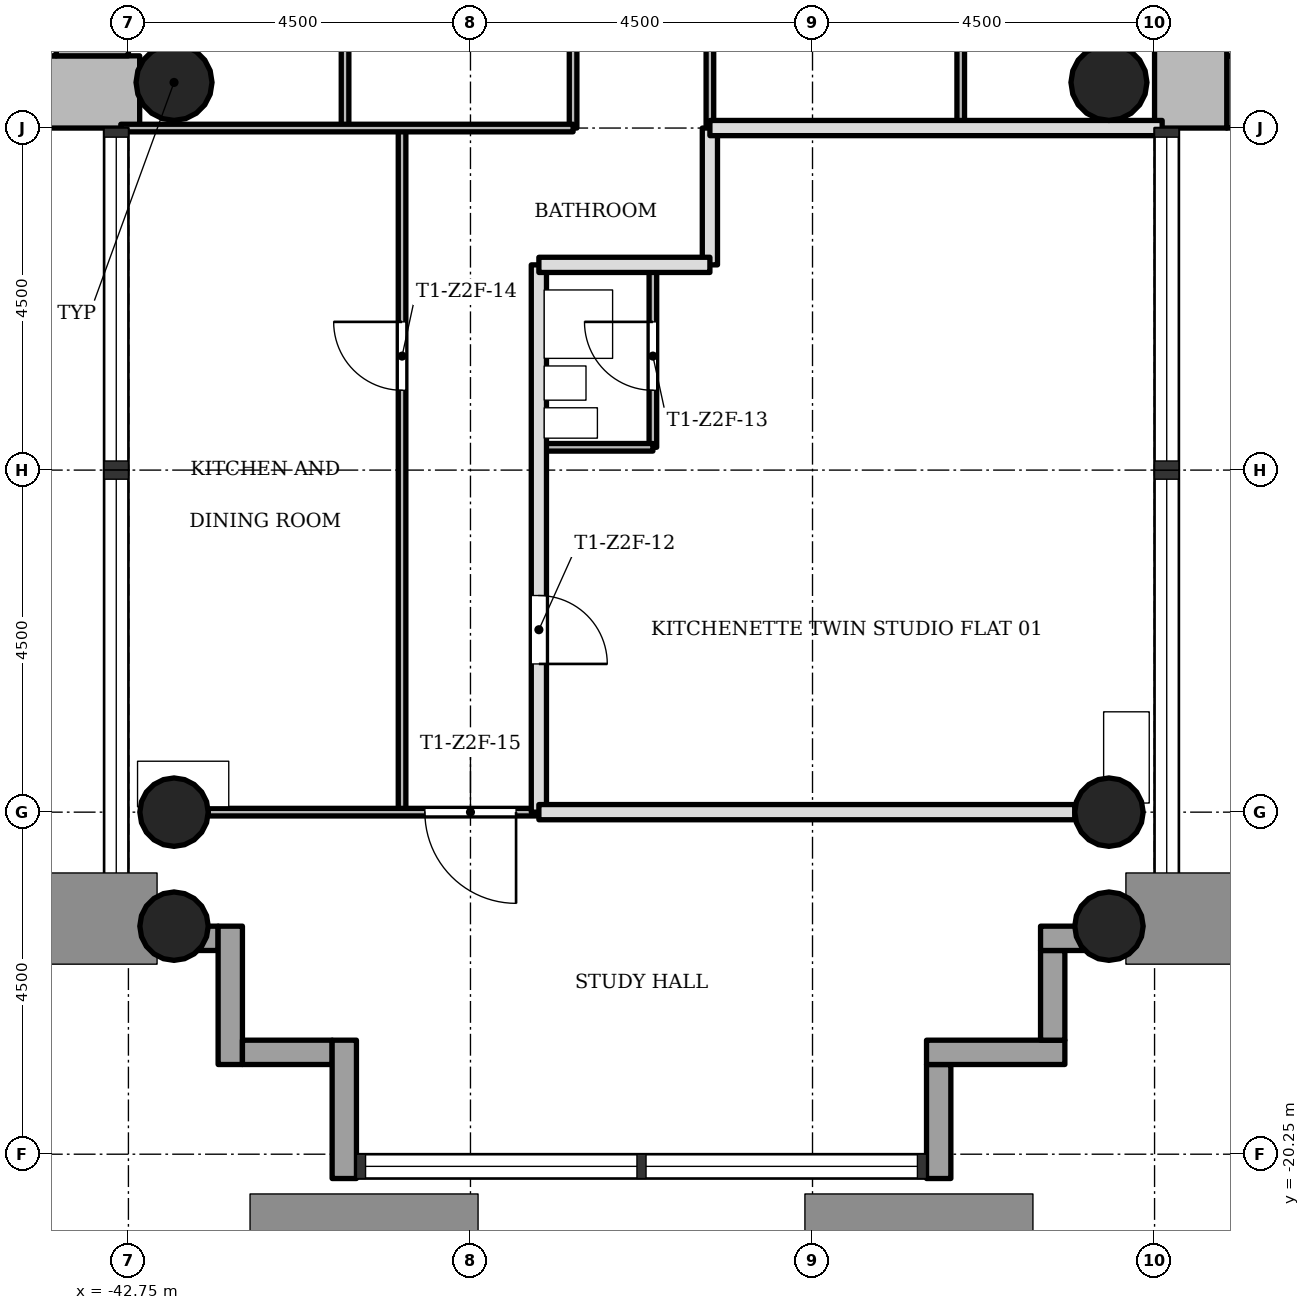
"""IFC4 building model, lengths in metres.
Left out: names, types, materials, properties, quantities, classifications, styles, units other than length and angle.
Written with IfcOpenShell. Run it as: python <this file> out.ifc"""

import sys

from ifc_helpers import new_model, si_unit, direction, frame, frame_2d, origin, origin_2d, place, context, subcontext, project, spatial, rectangle, hollow_circle, extrude, element, fill, save


model = new_model("IFC4")
c1 = context("Model", 3, precision=1e-05, world=origin(), true_north=direction((0.0, 1.0)))
c2 = subcontext(c1, "Body", "Model", "MODEL_VIEW")
j1 = project(units=[si_unit("LENGTHUNIT", "METRE"), si_unit("PLANEANGLEUNIT", "RADIAN")], contexts=[c1])
p1 = place(None, origin())
s1 = spatial("IfcSite", under=j1, at=p1, CompositionType="ELEMENT")
p2 = place(p1, origin())
s2 = spatial("IfcBuilding", under=s1, at=p2, CompositionType="ELEMENT")
p3 = place(p2, frame((0.0, 0.0, 107.2)))
s3 = spatial("IfcBuildingStorey", under=s2, at=p3, CompositionType="ELEMENT", Elevation=107.2)
p4 = place(p3, frame((-28.3, -6.275, 0.0), z_axis=(0.0, 0.0, 1.0), x_axis=(1.0, 0.0, 0.0)))
e1 = element("IfcWall", 1, at=p4, inside=s3, PredefinedType="SHEAR", context=c2, shape_type="SweptSolid", body=[
    extrude(rectangle(XDim=8.05, YDim=0.95, at=frame_2d((4.025, 0.0))), origin(), (0.0, 0.0, 1.0), 3.4),
])
p5 = place(p3, frame((-28.775, 5.8, 0.0), z_axis=(0.0, 0.0, 1.0), x_axis=(0.0, -1.0, 0.0)))
e2 = element("IfcWall", 2, at=p5, inside=s3, PredefinedType="SHEAR", context=c2, shape_type="SweptSolid", body=[
    extrude(rectangle(XDim=12.55, YDim=0.95, at=frame_2d((6.275, 0.0))), origin(), (0.0, 0.0, 1.0), 3.4),
])
p6 = place(p5, frame((4.9, 0.0, 0.0)))
e3 = element("IfcOpeningElement", 3, at=p6, cuts=e2, PredefinedType="OPENING", context=c2, shape_type="SweptSolid", body=[
    extrude(rectangle(XDim=1.8, YDim=2.1, at=frame_2d((0.9, 1.05))), frame((0.0, 0.485, 0.0), z_axis=(0.0, -1.0, 0.0), x_axis=(1.0, 0.0, 0.0)), (0.0, 0.0, 1.0), 0.97),
])
p7 = place(p3, frame((-51.298, -6.275, 0.0), z_axis=(0.0, 0.0, 1.0), x_axis=(1.0, 0.0, 0.0)))
e4 = element("IfcWall", 4, at=p7, inside=s3, PredefinedType="SHEAR", context=c2, shape_type="SweptSolid", body=[
    extrude(rectangle(XDim=8.696, YDim=0.95, at=frame_2d((4.348, 0.0))), origin(), (0.0, 0.0, 1.0), 3.4),
])
p8 = place(p3, frame((-43.225, -5.8, 0.0), z_axis=(0.0, 0.0, 1.0), x_axis=(0.0, 1.0, 0.0)))
e5 = element("IfcWall", 5, at=p8, inside=s3, PredefinedType="SHEAR", context=c2, shape_type="SweptSolid", body=[
    extrude(rectangle(XDim=12.55, YDim=0.95, at=frame_2d((6.275, 0.0))), origin(), (0.0, 0.0, 1.0), 3.4),
])
p9 = place(p8, frame((4.9, 0.0, 0.0)))
e6 = element("IfcOpeningElement", 6, at=p9, cuts=e5, PredefinedType="OPENING", context=c2, shape_type="SweptSolid", body=[
    extrude(rectangle(XDim=1.8, YDim=2.1, at=frame_2d((0.9, 1.05))), frame((0.0, 0.485, 0.0), z_axis=(0.0, -1.0, 0.0), x_axis=(1.0, 0.0, 0.0)), (0.0, 0.0, 1.0), 0.97),
])
for number, where, z_axis, x_axis in (
    (7, (-42.15, -15.75, 0.0), (0.0, 0.0, 1.0), (1.0, 0.0, 0.0)),
    (8, (-29.85, -15.75, 0.0), (0.0, 0.0, 1.0), (1.0, 0.0, 0.0)),
    (9, (-42.15, -17.25, 0.0), (0.0, 0.0, 1.0), (1.0, 0.0, 0.0)),
    (10, (-29.85, -17.25, 0.0), (0.0, 0.0, 1.0), (1.0, 0.0, 0.0)),
):
    element("IfcColumn", number, at=place(p3, frame(where, z_axis=z_axis, x_axis=x_axis)), inside=s3, PredefinedType="COLUMN", context=c2, shape_type="SweptSolid", body=[
        extrude(hollow_circle(Radius=0.45, WallThickness=0.032, at=origin_2d()), origin(), (0.0, 0.0, 1.0), 3.4),
    ])
for number, where, z_axis, x_axis in (
    (11, (-42.15, -6.15, 0.0), (0.0, 0.0, 1.0), (1.0, 0.0, 0.0)),
    (12, (-29.85, -6.15, 0.0), (0.0, 0.0, 1.0), (1.0, 0.0, 0.0)),
):
    element("IfcColumn", number, at=place(p3, frame(where, z_axis=z_axis, x_axis=x_axis)), inside=s3, PredefinedType="COLUMN", context=c2, shape_type="SweptSolid", body=[
        extrude(hollow_circle(Radius=0.5, WallThickness=0.036, at=origin_2d()), origin(), (0.0, 0.0, 1.0), 3.4),
    ])
p10 = place(p3, frame((-43.07, -17.41, -0.3), z_axis=(0.0, 0.0, 1.0), x_axis=(1.0, 0.0, 0.0)))
e13 = element("IfcWall", 13, at=p10, inside=s3, PredefinedType="STANDARD", context=c2, shape_type="SweptSolid", body=[
    extrude(rectangle(XDim=1.5, YDim=0.32, at=frame_2d((0.75, 0.0))), origin(), (0.0, 0.0, 1.0), 3.4),
])
p11 = place(p3, frame((-41.41, -17.25, -0.3), z_axis=(0.0, 0.0, 1.0), x_axis=(0.0, -1.0, 0.0)))
e14 = element("IfcWall", 14, at=p11, inside=s3, PredefinedType="STANDARD", context=c2, shape_type="SweptSolid", body=[
    extrude(rectangle(XDim=1.82, YDim=0.32, at=frame_2d((0.91, 0.0))), origin(), (0.0, 0.0, 1.0), 3.4),
])
p12 = place(p3, frame((-41.25, -18.91, -0.3), z_axis=(0.0, 0.0, 1.0), x_axis=(1.0, 0.0, 0.0)))
e15 = element("IfcWall", 15, at=p12, inside=s3, PredefinedType="STANDARD", context=c2, shape_type="SweptSolid", body=[
    extrude(rectangle(XDim=1.18, YDim=0.32, at=frame_2d((0.59, 0.0))), origin(), (0.0, 0.0, 1.0), 3.4),
])
p13 = place(p3, frame((-39.91, -18.75, -0.3), z_axis=(0.0, 0.0, 1.0), x_axis=(0.0, -1.0, 0.0)))
e16 = element("IfcWall", 16, at=p13, inside=s3, PredefinedType="STANDARD", context=c2, shape_type="SweptSolid", body=[
    extrude(rectangle(XDim=1.82, YDim=0.32, at=frame_2d((0.91, 0.0))), origin(), (0.0, 0.0, 1.0), 3.4),
])
p14 = place(p3, frame((-32.09, -20.57, -0.3), z_axis=(0.0, 0.0, 1.0), x_axis=(0.0, 1.0, 0.0)))
e17 = element("IfcWall", 17, at=p14, inside=s3, PredefinedType="STANDARD", context=c2, shape_type="SweptSolid", body=[
    extrude(rectangle(XDim=1.5, YDim=0.32, at=frame_2d((0.75, 0.0))), origin(), (0.0, 0.0, 1.0), 3.4),
])
p15 = place(p3, frame((-32.25, -18.91, -0.3), z_axis=(0.0, 0.0, 1.0), x_axis=(1.0, 0.0, 0.0)))
e18 = element("IfcWall", 18, at=p15, inside=s3, PredefinedType="STANDARD", context=c2, shape_type="SweptSolid", body=[
    extrude(rectangle(XDim=1.82, YDim=0.32, at=frame_2d((0.91, 0.0))), origin(), (0.0, 0.0, 1.0), 3.4),
])
p16 = place(p3, frame((-30.59, -18.75, -0.3), z_axis=(0.0, 0.0, 1.0), x_axis=(0.0, 1.0, 0.0)))
e19 = element("IfcWall", 19, at=p16, inside=s3, PredefinedType="STANDARD", context=c2, shape_type="SweptSolid", body=[
    extrude(rectangle(XDim=1.18, YDim=0.32, at=frame_2d((0.59, 0.0))), origin(), (0.0, 0.0, 1.0), 3.4),
])
p17 = place(p3, frame((-30.75, -17.41, -0.3), z_axis=(0.0, 0.0, 1.0), x_axis=(1.0, 0.0, 0.0)))
e20 = element("IfcWall", 20, at=p17, inside=s3, PredefinedType="STANDARD", context=c2, shape_type="SweptSolid", body=[
    extrude(rectangle(XDim=1.82, YDim=0.32, at=frame_2d((0.91, 0.0))), origin(), (0.0, 0.0, 1.0), 3.4),
])
p18 = place(p3, frame((-39.9, -6.75, 0.0), z_axis=(0.0, 0.0, 1.0), x_axis=(0.0, 1.0, 0.0)))
e21 = element("IfcWall", 21, at=p18, inside=s3, PredefinedType="PARTITIONING", context=c2, shape_type="SweptSolid", body=[
    extrude(rectangle(XDim=5.25, YDim=0.1, at=frame_2d((2.625, 0.0))), origin(), (0.0, 0.0, 1.0), 3.0),
])
p19 = place(p3, frame((-39.15, -15.75, 0.0), z_axis=(0.0, 0.0, 1.0), x_axis=(0.0, 1.0, 0.0)))
e22 = element("IfcWall", 22, at=p19, inside=s3, PredefinedType="PARTITIONING", context=c2, shape_type="SweptSolid", body=[
    extrude(rectangle(XDim=9.0, YDim=0.1, at=frame_2d((4.5, 0.0))), origin(), (0.0, 0.0, 1.0), 3.0),
])
p20 = place(p19, frame((5.55, 0.0, 0.0)))
e23 = element("IfcOpeningElement", 23, at=p20, cuts=e22, PredefinedType="OPENING", context=c2, shape_type="SweptSolid", body=[
    extrude(rectangle(XDim=0.9, YDim=2.1, at=frame_2d((0.45, 1.05))), frame((0.0, 0.06, 0.0), z_axis=(0.0, -1.0, 0.0), x_axis=(1.0, 0.0, 0.0)), (0.0, 0.0, 1.0), 0.12),
])
p21 = place(p3, frame((-37.35, -15.75, 0.0), z_axis=(0.0, 0.0, 1.0), x_axis=(0.0, 1.0, 0.0)))
e24 = element("IfcWall", 24, at=p21, inside=s3, PredefinedType="SOLIDWALL", context=c2, shape_type="SweptSolid", body=[
    extrude(rectangle(XDim=7.2, YDim=0.2, at=frame_2d((3.6, 0.0))), origin(), (0.0, 0.0, 1.0), 3.0),
])
p22 = place(p21, frame((1.95, 0.0, 0.0)))
e25 = element("IfcOpeningElement", 25, at=p22, cuts=e24, PredefinedType="OPENING", context=c2, shape_type="SweptSolid", body=[
    extrude(rectangle(XDim=0.9, YDim=2.1, at=frame_2d((0.45, 1.05))), frame((0.0, 0.11, 0.0), z_axis=(0.0, -1.0, 0.0), x_axis=(1.0, 0.0, 0.0)), (0.0, 0.0, 1.0), 0.22),
])
p23 = place(p3, frame((-36.9, -6.75, 0.0), z_axis=(0.0, 0.0, 1.0), x_axis=(0.0, 1.0, 0.0)))
e26 = element("IfcWall", 26, at=p23, inside=s3, PredefinedType="PARTITIONING", context=c2, shape_type="SweptSolid", body=[
    extrude(rectangle(XDim=5.25, YDim=0.1, at=frame_2d((2.625, 0.0))), origin(), (0.0, 0.0, 1.0), 3.0),
])
p24 = place(p23, frame((2.175, 0.0, 0.0)))
e27 = element("IfcOpeningElement", 27, at=p24, cuts=e26, PredefinedType="OPENING", context=c2, shape_type="SweptSolid", body=[
    extrude(rectangle(XDim=0.9, YDim=2.1, at=frame_2d((0.45, 1.05))), frame((0.0, 0.06, 0.0), z_axis=(0.0, -1.0, 0.0), x_axis=(1.0, 0.0, 0.0)), (0.0, 0.0, 1.0), 0.12),
])
p25 = place(p3, frame((-35.85, -10.95, 0.0), z_axis=(0.0, 0.0, 1.0), x_axis=(0.0, 1.0, 0.0)))
e28 = element("IfcWall", 28, at=p25, inside=s3, PredefinedType="PARTITIONING", context=c2, shape_type="SweptSolid", body=[
    extrude(rectangle(XDim=2.4, YDim=0.1, at=frame_2d((1.2, 0.0))), origin(), (0.0, 0.0, 1.0), 3.0),
])
p26 = place(p25, frame((0.75, 0.0, 0.0)))
e29 = element("IfcOpeningElement", 29, at=p26, cuts=e28, PredefinedType="OPENING", context=c2, shape_type="SweptSolid", body=[
    extrude(rectangle(XDim=0.9, YDim=2.1, at=frame_2d((0.45, 1.05))), frame((0.0, 0.06, 0.0), z_axis=(0.0, -1.0, 0.0), x_axis=(1.0, 0.0, 0.0)), (0.0, 0.0, 1.0), 0.12),
])
p27 = place(p3, frame((-35.1, -6.75, 0.0), z_axis=(0.0, 0.0, 1.0), x_axis=(0.0, 1.0, 0.0)))
e30 = element("IfcWall", 30, at=p27, inside=s3, PredefinedType="PARTITIONING", context=c2, shape_type="SweptSolid", body=[
    extrude(rectangle(XDim=5.25, YDim=0.1, at=frame_2d((2.625, 0.0))), origin(), (0.0, 0.0, 1.0), 3.0),
])
p28 = place(p27, frame((2.175, 0.0, 0.0)))
e31 = element("IfcOpeningElement", 31, at=p28, cuts=e30, PredefinedType="OPENING", context=c2, shape_type="SweptSolid", body=[
    extrude(rectangle(XDim=0.9, YDim=2.1, at=frame_2d((0.45, 1.05))), frame((0.0, 0.06, 0.0), z_axis=(0.0, -1.0, 0.0), x_axis=(1.0, 0.0, 0.0)), (0.0, 0.0, 1.0), 0.12),
])
p29 = place(p3, frame((-35.1, -8.55, 0.0), z_axis=(0.0, 0.0, 1.0), x_axis=(0.0, 1.0, 0.0)))
e32 = element("IfcWall", 32, at=p29, inside=s3, PredefinedType="SOLIDWALL", context=c2, shape_type="SweptSolid", body=[
    extrude(rectangle(XDim=1.8, YDim=0.2, at=frame_2d((0.9, 0.0))), origin(), (0.0, 0.0, 1.0), 3.0),
])
p30 = place(p3, frame((-31.8, -6.75, 0.0), z_axis=(0.0, 0.0, 1.0), x_axis=(0.0, 1.0, 0.0)))
e33 = element("IfcWall", 33, at=p30, inside=s3, PredefinedType="PARTITIONING", context=c2, shape_type="SweptSolid", body=[
    extrude(rectangle(XDim=5.25, YDim=0.1, at=frame_2d((2.625, 0.0))), origin(), (0.0, 0.0, 1.0), 3.0),
])
p31 = place(p3, frame((-41.7, -15.75, 0.0), z_axis=(0.0, 0.0, 1.0), x_axis=(1.0, 0.0, 0.0)))
e34 = element("IfcWall", 34, at=p31, inside=s3, PredefinedType="PARTITIONING", context=c2, shape_type="SweptSolid", body=[
    extrude(rectangle(XDim=4.35, YDim=0.1, at=frame_2d((2.175, 0.0))), origin(), (0.0, 0.0, 1.0), 3.0),
])
p32 = place(p31, frame((2.85, 0.0, 0.0)))
e35 = element("IfcOpeningElement", 35, at=p32, cuts=e34, PredefinedType="OPENING", context=c2, shape_type="SweptSolid", body=[
    extrude(rectangle(XDim=1.2, YDim=2.1, at=frame_2d((0.6, 1.05))), frame((0.0, 0.06, 0.0), z_axis=(0.0, -1.0, 0.0), x_axis=(1.0, 0.0, 0.0)), (0.0, 0.0, 1.0), 0.12),
])
p33 = place(p3, frame((-37.35, -15.75, 0.0), z_axis=(0.0, 0.0, 1.0), x_axis=(1.0, 0.0, 0.0)))
e36 = element("IfcWall", 36, at=p33, inside=s3, PredefinedType="SOLIDWALL", context=c2, shape_type="SweptSolid", body=[
    extrude(rectangle(XDim=7.05, YDim=0.2, at=frame_2d((3.525, 0.0))), origin(), (0.0, 0.0, 1.0), 3.0),
])
p34 = place(p3, frame((-37.35, -10.95, 0.0), z_axis=(0.0, 0.0, 1.0), x_axis=(1.0, 0.0, 0.0)))
e37 = element("IfcWall", 37, at=p34, inside=s3, PredefinedType="PARTITIONING", context=c2, shape_type="SweptSolid", body=[
    extrude(rectangle(XDim=1.5, YDim=0.1, at=frame_2d((0.75, 0.0))), origin(), (0.0, 0.0, 1.0), 3.0),
])
p35 = place(p3, frame((-37.35, -8.55, 0.0), z_axis=(0.0, 0.0, 1.0), x_axis=(1.0, 0.0, 0.0)))
e38 = element("IfcWall", 38, at=p35, inside=s3, PredefinedType="SOLIDWALL", context=c2, shape_type="SweptSolid", body=[
    extrude(rectangle(XDim=2.25, YDim=0.2, at=frame_2d((1.125, 0.0))), origin(), (0.0, 0.0, 1.0), 3.0),
])
p36 = place(p3, frame((-42.85, -6.75, 0.0), z_axis=(0.0, 0.0, 1.0), x_axis=(1.0, 0.0, 0.0)))
e39 = element("IfcWall", 39, at=p36, inside=s3, PredefinedType="PARTITIONING", context=c2, shape_type="SweptSolid", body=[
    extrude(rectangle(XDim=5.95, YDim=0.1, at=frame_2d((2.975, 0.0))), origin(), (0.0, 0.0, 1.0), 3.0),
])
p37 = place(p3, frame((-35.1, -6.75, 0.0), z_axis=(0.0, 0.0, 1.0), x_axis=(1.0, 0.0, 0.0)))
e40 = element("IfcWall", 40, at=p37, inside=s3, PredefinedType="SOLIDWALL", context=c2, shape_type="SweptSolid", body=[
    extrude(rectangle(XDim=5.95, YDim=0.2, at=frame_2d((2.975, 0.0))), origin(), (0.0, 0.0, 1.0), 3.0),
])
p38 = place(p3, frame((-43.825, -1.9, 0.0), z_axis=(0.0, 0.0, 1.0), x_axis=(0.0, -1.0, 0.0)))
e41 = element("IfcWall", 41, at=p38, inside=s3, PredefinedType="SHEAR", context=c2, shape_type="SweptSolid", body=[
    extrude(rectangle(XDim=3.9, YDim=0.25, at=frame_2d((1.95, 0.0))), origin(), (0.0, 0.0, 1.0), 3.4),
])
p39 = place(p22, origin())
e42 = element("IfcDoor", 42, at=p39, inside=s3, OperationType="SINGLE_SWING_LEFT", PredefinedType="DOOR", context=c2, shape_type="SweptSolid", body=[
    extrude(rectangle(XDim=0.9, YDim=2.1, at=frame_2d((0.45, 1.05))), frame((0.0, 0.025, 0.0), z_axis=(0.0, -1.0, 0.0), x_axis=(1.0, 0.0, 0.0)), (0.0, 0.0, 1.0), 0.05),
])
fill(e25, e42)
p40 = place(p26, origin())
e43 = element("IfcDoor", 43, at=p40, inside=s3, OperationType="SINGLE_SWING_LEFT", PredefinedType="DOOR", context=c2, shape_type="SweptSolid", body=[
    extrude(rectangle(XDim=0.9, YDim=2.1, at=frame_2d((0.45, 1.05))), frame((0.0, 0.025, 0.0), z_axis=(0.0, -1.0, 0.0), x_axis=(1.0, 0.0, 0.0)), (0.0, 0.0, 1.0), 0.05),
])
fill(e29, e43)
p41 = place(p20, origin())
e44 = element("IfcDoor", 44, at=p41, inside=s3, OperationType="SINGLE_SWING_LEFT", PredefinedType="DOOR", context=c2, shape_type="SweptSolid", body=[
    extrude(rectangle(XDim=0.9, YDim=2.1, at=frame_2d((0.45, 1.05))), frame((0.0, 0.025, 0.0), z_axis=(0.0, -1.0, 0.0), x_axis=(1.0, 0.0, 0.0)), (0.0, 0.0, 1.0), 0.05),
])
fill(e23, e44)
p42 = place(p32, origin())
e45 = element("IfcDoor", 45, at=p42, inside=s3, OperationType="SINGLE_SWING_RIGHT", PredefinedType="DOOR", context=c2, shape_type="SweptSolid", body=[
    extrude(rectangle(XDim=1.2, YDim=2.1, at=frame_2d((0.6, 1.05))), frame((0.0, 0.025, 0.0), z_axis=(0.0, -1.0, 0.0), x_axis=(1.0, 0.0, 0.0)), (0.0, 0.0, 1.0), 0.05),
])
fill(e35, e45)
save(model, sys.argv[1])
